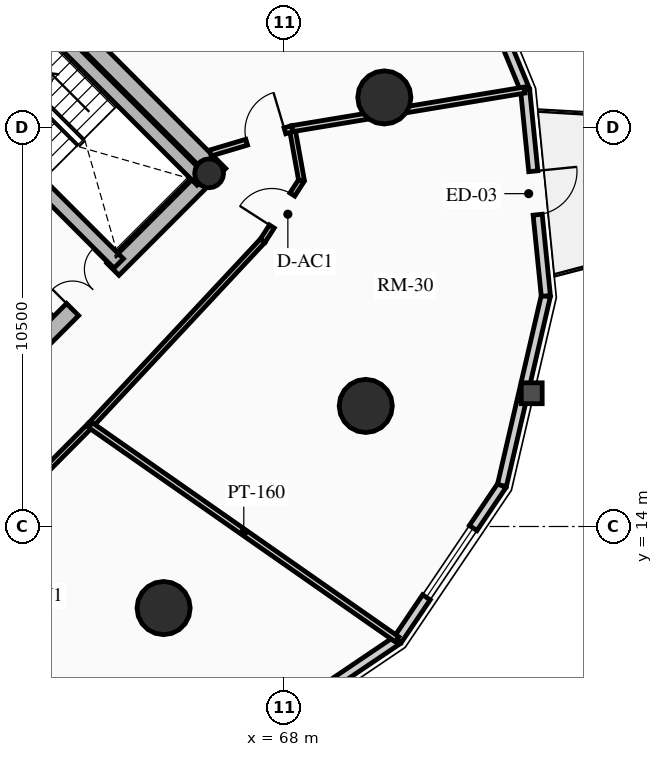
"""IFC4 building model, lengths in metres.
Left out: names, types, materials, properties, quantities, classifications, styles, units other than length and angle.
Written with IfcOpenShell. Run it as: python <this file> out.ifc"""

import sys

from ifc_helpers import new_model, si_unit, direction, frame, frame_2d, origin, origin_2d, place, context, subcontext, project, spatial, rectangle, circle, hollow_circle, extrude, source, transform, mapped, element, fill, save


model = new_model("IFC4")
c1 = context("Model", 3, precision=1e-05, world=origin(), true_north=direction((0.0, 1.0)))
c2 = subcontext(c1, "Body", "Model", "MODEL_VIEW")
j1 = project(units=[si_unit("LENGTHUNIT", "METRE"), si_unit("PLANEANGLEUNIT", "RADIAN")], contexts=[c1])
p1 = place(None, origin())
s1 = spatial("IfcSite", under=j1, at=p1, CompositionType="ELEMENT")
p2 = place(p1, origin())
s2 = spatial("IfcBuilding", under=s1, at=p2, CompositionType="ELEMENT")
p3 = place(p2, frame((0.0, 0.0, 113.8)))
s3 = spatial("IfcBuildingStorey", under=s2, at=p3, CompositionType="ELEMENT", Elevation=113.8)
p4 = place(p3, frame((66.303, 23.263, 0.0), z_axis=(0.0, 0.0, 1.0), x_axis=(-0.707106781187, 0.707106781187, 0.0)))
e1 = element("IfcWall", 1, at=p4, inside=s3, PredefinedType="SHEAR", context=c2, shape_type="SweptSolid", body=[
    extrude(rectangle(XDim=14.2, YDim=0.45, at=frame_2d((7.1, 0.0))), origin(), (0.0, 0.0, 1.0), 2.91),
])
p5 = place(p3, frame((58.578, 15.856, 0.0), z_axis=(0.0, 0.0, 1.0), x_axis=(0.707106781187, 0.707106781187, 0.0)))
e2 = element("IfcWall", 2, at=p5, inside=s3, PredefinedType="SHEAR", context=c2, shape_type="SweptSolid", body=[
    extrude(rectangle(XDim=10.7, YDim=0.45, at=frame_2d((5.35, 0.0))), origin(), (0.0, 0.0, 1.0), 2.91),
])
m1 = source(origin(), c2, "Body", "SweptSolid", [
    extrude(rectangle(XDim=1.5, YDim=2.02, at=frame_2d((0.75, 1.01))), frame((0.0, 0.235, 0.0), z_axis=(0.0, -1.0, 0.0), x_axis=(1.0, 0.0, 0.0)), (0.0, 0.0, 1.0), 0.47),
])
p6 = place(p5, frame((5.45, 0.0, 0.0)))
e3 = element("IfcOpeningElement", 3, at=p6, cuts=e2, PredefinedType="OPENING", context=c2, shape_type="MappedRepresentation", body=[
    mapped(m1, transform((0.0, 0.0, 0.0), x_axis=(1.0, 0.0, 0.0), y_axis=(0.0, 1.0, 0.0), z_axis=(0.0, 0.0, 1.0), scale=1.0)),
])
p7 = place(p3, frame((63.645, 20.922, 0.0), z_axis=(0.0, 0.0, 1.0), x_axis=(-0.707106781187, 0.707106781187, 0.0)))
e4 = element("IfcWall", 4, at=p7, inside=s3, PredefinedType="SHEAR", context=c2, shape_type="SweptSolid", body=[
    extrude(rectangle(XDim=13.75, YDim=0.35, at=frame_2d((6.875, 0.0))), origin(), (0.0, 0.0, 1.0), 2.91),
])
m2 = source(origin(), c2, "Body", "SweptSolid", [
    extrude(rectangle(XDim=1.1, YDim=2.015, at=frame_2d((0.55, 1.007))), frame((0.0, 0.185, 0.0), z_axis=(0.0, -1.0, 0.0), x_axis=(1.0, 0.0, 0.0)), (0.0, 0.0, 1.0), 0.37),
])
p8 = place(p7, frame((10.0, 0.0, 0.0)))
e5 = element("IfcOpeningElement", 5, at=p8, cuts=e4, PredefinedType="OPENING", context=c2, shape_type="MappedRepresentation", body=[
    mapped(m2, transform((0.0, 0.0, 0.0), x_axis=(1.0, 0.0, 0.0), y_axis=(0.0, 1.0, 0.0), z_axis=(0.0, 0.0, 1.0), scale=1.0)),
])
p9 = place(p7, frame((12.0, 0.0, 0.0)))
e6 = element("IfcOpeningElement", 6, at=p9, cuts=e4, PredefinedType="OPENING", context=c2, shape_type="MappedRepresentation", body=[
    mapped(m2, transform((0.0, 0.0, 0.0), x_axis=(1.0, 0.0, 0.0), y_axis=(0.0, 1.0, 0.0), z_axis=(0.0, 0.0, 1.0), scale=1.0)),
])
m3 = source(origin(), c2, "Body", "SweptSolid", [
    extrude(rectangle(XDim=1.15, YDim=2.02, at=frame_2d((0.575, 1.01))), frame((0.0, 0.185, 0.0), z_axis=(0.0, -1.0, 0.0), x_axis=(1.0, 0.0, 0.0)), (0.0, 0.0, 1.0), 0.37),
])
p10 = place(p7, frame((5.305, 0.0, 0.0)))
e7 = element("IfcOpeningElement", 7, at=p10, cuts=e4, PredefinedType="OPENING", context=c2, shape_type="MappedRepresentation", body=[
    mapped(m3, transform((0.0, 0.0, 0.0), x_axis=(1.0, 0.0, 0.0), y_axis=(0.0, 1.0, 0.0), z_axis=(0.0, 0.0, 1.0), scale=1.0)),
])
p11 = place(p3, frame((65.83, 23.107, 0.0), z_axis=(0.0, 0.0, 1.0), x_axis=(-0.707088616009, 0.707124945897, 0.0)))
e8 = element("IfcWall", 8, at=p11, inside=s3, PredefinedType="SHEAR", context=c2, shape_type="SweptSolid", body=[
    extrude(rectangle(XDim=6.72, YDim=0.35, at=frame_2d((3.36, 0.0))), origin(), (0.0, 0.0, 1.0), 2.91),
])
p12 = place(p3, frame((66.024, 23.294, 0.0), z_axis=(0.0, 0.0, 1.0), x_axis=(0.707106781187, 0.707106781187, 0.0)))
e9 = element("IfcColumn", 9, at=p12, inside=s3, PredefinedType="COLUMN", context=c2, shape_type="SweptSolid", body=[
    extrude(hollow_circle(Radius=0.38, WallThickness=0.032, at=origin_2d()), origin(), (0.0, 0.0, 1.0), 2.91),
])
for number, where, z_axis, x_axis in (
    (10, (64.827, 11.854, 0.0), (0.0, 0.0, 1.0), (1.0, 0.0, 0.0)),
    (11, (70.146, 17.173, 0.0), (0.0, 0.0, 1.0), (1.0, 0.0, 0.0)),
    (12, (70.635, 25.291, 0.0), (0.0, 0.0, 1.0), (1.0, 0.0, 0.0)),
):
    element("IfcColumn", number, at=place(p3, frame(where, z_axis=z_axis, x_axis=x_axis)), inside=s3, PredefinedType="USERDEFINED", context=c2, shape_type="SweptSolid", body=[
        extrude(circle(Radius=0.7, at=origin_2d()), origin(), (0.0, 0.0, 1.0), 2.91),
    ])
p13 = place(p3, frame((70.985, 11.015, 0.0), z_axis=(0.0, 0.0, 1.0), x_axis=(-0.828781148131, -0.559572880421, 0.0)))
e13 = element("IfcWall", 13, at=p13, inside=s3, PredefinedType="SOLIDWALL", context=c2, shape_type="SweptSolid", body=[
    extrude(rectangle(XDim=4.905, YDim=0.24, at=frame_2d((2.452, 0.0))), origin(), (0.0, 0.0, 1.0), 2.179),
])
p14 = place(p3, frame((73.729, 15.08, 0.0), z_axis=(0.0, 0.0, 1.0), x_axis=(-0.559572880421, -0.828781148131, 0.0)))
e14 = element("IfcWall", 14, at=p14, inside=s3, PredefinedType="SOLIDWALL", context=c2, shape_type="SweptSolid", body=[
    extrude(rectangle(XDim=4.905, YDim=0.24, at=frame_2d((2.452, 0.0))), origin(), (0.0, 0.0, 1.0), 2.179),
])
m4 = source(origin(), c2, "Body", "SweptSolid", [
    extrude(rectangle(XDim=2.2, YDim=1.35, at=frame_2d((1.1, 0.675))), frame((0.0, 0.13, 0.0), z_axis=(0.0, -1.0, 0.0), x_axis=(1.0, 0.0, 0.0)), (0.0, 0.0, 1.0), 0.26),
])
p15 = place(p14, frame((1.352, 0.0, 0.65)))
e15 = element("IfcOpeningElement", 15, at=p15, cuts=e14, PredefinedType="OPENING", context=c2, shape_type="MappedRepresentation", body=[
    mapped(m4, transform((0.0, 0.0, 0.0), x_axis=(1.0, 0.0, 0.0), y_axis=(0.0, 1.0, 0.0), z_axis=(0.0, 0.0, 1.0), scale=1.0)),
])
p16 = place(p3, frame((74.885, 20.067, 0.0), z_axis=(0.0, 0.0, 1.0), x_axis=(-0.225834725257, -0.974165631126, 0.0)))
e16 = element("IfcWall", 16, at=p16, inside=s3, PredefinedType="SOLIDWALL", context=c2, shape_type="SweptSolid", body=[
    extrude(rectangle(XDim=5.119, YDim=0.24, at=frame_2d((2.56, 0.0))), origin(), (0.0, 0.0, 1.0), 2.179),
])
p17 = place(p3, frame((74.339, 25.487, 0.0), z_axis=(0.0, 0.0, 1.0), x_axis=(0.10015591906, -0.994971754311, 0.0)))
e17 = element("IfcWall", 17, at=p17, inside=s3, PredefinedType="SOLIDWALL", context=c2, shape_type="SweptSolid", body=[
    extrude(rectangle(XDim=5.448, YDim=0.24, at=frame_2d((2.724, 0.0))), origin(), (0.0, 0.0, 1.0), 2.179),
])
m5 = source(origin(), c2, "Body", "SweptSolid", [
    extrude(rectangle(XDim=1.15, YDim=2.005, at=frame_2d((0.575, 1.002))), frame((0.0, 0.13, 0.0), z_axis=(0.0, -1.0, 0.0), x_axis=(1.0, 0.0, 0.0)), (0.0, 0.0, 1.0), 0.26),
])
p18 = place(p17, frame((2.149, 0.0, 0.0)))
e18 = element("IfcOpeningElement", 18, at=p18, cuts=e17, PredefinedType="OPENING", context=c2, shape_type="MappedRepresentation", body=[
    mapped(m5, transform((0.0, 0.0, 0.0), x_axis=(1.0, 0.0, 0.0), y_axis=(0.0, 1.0, 0.0), z_axis=(0.0, 0.0, 1.0), scale=1.0)),
])
p19 = place(p3, frame((72.145, 30.811, 0.0), z_axis=(0.0, 0.0, 1.0), x_axis=(0.381027003055, -0.924563909604, 0.0)))
e19 = element("IfcWall", 19, at=p19, inside=s3, PredefinedType="SOLIDWALL", context=c2, shape_type="SweptSolid", body=[
    extrude(rectangle(XDim=5.758, YDim=0.24, at=frame_2d((2.879, 0.0))), origin(), (0.0, 0.0, 1.0), 2.179),
])
p20 = place(p3, frame((60.562, 14.31, 0.0), z_axis=(0.0, 0.0, 1.0), x_axis=(0.704566236161, 0.709638230975, 0.0)))
e20 = element("IfcWall", 20, at=p20, inside=s3, PredefinedType="PARTITIONING", context=c2, shape_type="SweptSolid", body=[
    extrude(rectangle(XDim=3.321, YDim=0.15, at=frame_2d((1.661, 0.0))), origin(), (0.0, 0.0, 1.0), 2.225),
])
p21 = place(p3, frame((62.903, 16.667, 0.0), z_axis=(0.0, 0.0, 1.0), x_axis=(0.682371947497, 0.731005147225, 0.0)))
e21 = element("IfcWall", 21, at=p21, inside=s3, PredefinedType="PARTITIONING", context=c2, shape_type="SweptSolid", body=[
    extrude(rectangle(XDim=6.642, YDim=0.15, at=frame_2d((3.321, 0.0))), origin(), (0.0, 0.0, 1.0), 2.225),
])
p22 = place(p3, frame((67.435, 21.521, 0.0), z_axis=(0.0, 0.0, 1.0), x_axis=(0.540777197838, 0.841165870859, 0.0)))
e22 = element("IfcWall", 22, at=p22, inside=s3, PredefinedType="PARTITIONING", context=c2, shape_type="SweptSolid", body=[
    extrude(rectangle(XDim=1.888, YDim=0.15, at=frame_2d((0.944, 0.0))), origin(), (0.0, 0.0, 1.0), 2.225),
])
m6 = source(origin(), c2, "Body", "SweptSolid", [
    extrude(rectangle(XDim=1.0, YDim=2.015, at=frame_2d((0.5, 1.007))), frame((0.0, 0.085, 0.0), z_axis=(0.0, -1.0, 0.0), x_axis=(1.0, 0.0, 0.0)), (0.0, 0.0, 1.0), 0.17),
])
p23 = place(p22, frame((0.444, 0.0, 0.0)))
e23 = element("IfcOpeningElement", 23, at=p23, cuts=e22, PredefinedType="OPENING", context=c2, shape_type="MappedRepresentation", body=[
    mapped(m6, transform((0.0, 0.0, 0.0), x_axis=(1.0, 0.0, 0.0), y_axis=(0.0, 1.0, 0.0), z_axis=(0.0, 0.0, 1.0), scale=1.0)),
])
p24 = place(p3, frame((68.456, 23.11, 0.0), z_axis=(0.0, 0.0, 1.0), x_axis=(-0.1772522795, 0.984165448191, 0.0)))
e24 = element("IfcWall", 24, at=p24, inside=s3, PredefinedType="PARTITIONING", context=c2, shape_type="SweptSolid", body=[
    extrude(rectangle(XDim=1.382, YDim=0.15, at=frame_2d((0.691, 0.0))), origin(), (0.0, 0.0, 1.0), 2.225),
])
p25 = place(p3, frame((62.903, 16.667, 0.0), z_axis=(0.0, 0.0, 1.0), x_axis=(0.819735047612, -0.572742919395, 0.0)))
e25 = element("IfcWall", 25, at=p25, inside=s3, PredefinedType="PARTITIONING", context=c2, shape_type="SweptSolid", body=[
    extrude(rectangle(XDim=9.842, YDim=0.16, at=frame_2d((4.921, 0.0))), origin(), (0.0, 0.0, 1.0), 2.179),
])
p26 = place(p3, frame((68.211, 24.469, 0.0), z_axis=(0.0, 0.0, 1.0), x_axis=(0.986479033329, 0.163887512651, 0.0)))
e26 = element("IfcWall", 26, at=p26, inside=s3, PredefinedType="PARTITIONING", context=c2, shape_type="SweptSolid", body=[
    extrude(rectangle(XDim=6.193, YDim=0.16, at=frame_2d((3.096, 0.0))), origin(), (0.0, 0.0, 1.0), 2.179),
])
p27 = place(p3, frame((66.056, 23.828, 0.0), z_axis=(0.0, 0.0, 1.0), x_axis=(0.958475403544, 0.285175210708, 0.0)))
e27 = element("IfcWall", 27, at=p27, inside=s3, PredefinedType="PARTITIONING", context=c2, shape_type="SweptSolid", body=[
    extrude(rectangle(XDim=2.248, YDim=0.16, at=frame_2d((1.124, 0.0))), origin(), (0.0, 0.0, 1.0), 2.225),
])
m7 = source(origin(), c2, "Body", "SweptSolid", [
    extrude(rectangle(XDim=1.05, YDim=2.015, at=frame_2d((0.525, 1.007))), frame((0.0, 0.09, 0.0), z_axis=(0.0, -1.0, 0.0), x_axis=(1.0, 0.0, 0.0)), (0.0, 0.0, 1.0), 0.18),
])
p28 = place(p27, frame((0.998, 0.0, 0.0)))
e28 = element("IfcOpeningElement", 28, at=p28, cuts=e27, PredefinedType="OPENING", context=c2, shape_type="MappedRepresentation", body=[
    mapped(m7, transform((0.0, 0.0, 0.0), x_axis=(1.0, 0.0, 0.0), y_axis=(0.0, 1.0, 0.0), z_axis=(0.0, 0.0, 1.0), scale=1.0)),
])
p29 = place(p3, frame((59.008, 13.963, 0.0), z_axis=(0.0, 0.0, 1.0), x_axis=(0.393439207333, -0.919350635032, 0.0)))
e29 = element("IfcWall", 29, at=p29, inside=s3, PredefinedType="PARTITIONING", context=c2, shape_type="SweptSolid", body=[
    extrude(rectangle(XDim=7.427, YDim=0.125, at=frame_2d((3.713, 0.0))), origin(), (0.0, 0.0, 1.0), 2.179),
])
m8 = source(origin(), c2, "Body", "SweptSolid", [
    extrude(rectangle(XDim=0.9, YDim=2.005, at=frame_2d((0.45, 1.002))), frame((0.0, 0.073, 0.0), z_axis=(0.0, -1.0, 0.0), x_axis=(1.0, 0.0, 0.0)), (0.0, 0.0, 1.0), 0.145),
])
p30 = place(p29, frame((1.8, 0.0, 0.0)))
e30 = element("IfcOpeningElement", 30, at=p30, cuts=e29, PredefinedType="OPENING", context=c2, shape_type="MappedRepresentation", body=[
    mapped(m8, transform((0.0, 0.0, 0.0), x_axis=(1.0, 0.0, 0.0), y_axis=(0.0, 1.0, 0.0), z_axis=(0.0, 0.0, 1.0), scale=1.0)),
])
m9 = source(origin(), c2, "Body", "SweptSolid", [
    extrude(rectangle(XDim=2.2, YDim=1.35, at=frame_2d((1.1, 0.675))), frame((0.0, 0.03, 0.0), z_axis=(0.0, -1.0, 0.0), x_axis=(1.0, 0.0, 0.0)), (0.0, 0.0, 1.0), 0.06),
])
p31 = place(p15, origin())
e31 = element("IfcWindow", 31, at=p31, inside=s3, PartitioningType="DOUBLE_PANEL_VERTICAL", PredefinedType="WINDOW", context=c2, shape_type="MappedRepresentation", body=[
    mapped(m9, transform((0.0, 0.0, 0.0), x_axis=(1.0, 0.0, 0.0), y_axis=(0.0, 1.0, 0.0), z_axis=(0.0, 0.0, 1.0), scale=1.0)),
])
fill(e15, e31)
m10 = source(origin(), c2, "Body", "SweptSolid", [
    extrude(rectangle(XDim=1.15, YDim=2.005, at=frame_2d((0.575, 1.002))), frame((0.0, 0.025, 0.0), z_axis=(0.0, -1.0, 0.0), x_axis=(1.0, 0.0, 0.0)), (0.0, 0.0, 1.0), 0.05),
])
p32 = place(p18, origin())
e32 = element("IfcDoor", 32, at=p32, inside=s3, OperationType="SINGLE_SWING_LEFT", PredefinedType="DOOR", context=c2, shape_type="MappedRepresentation", body=[
    mapped(m10, transform((0.0, 0.0, 0.0), x_axis=(1.0, 0.0, 0.0), y_axis=(0.0, 1.0, 0.0), z_axis=(0.0, 0.0, 1.0), scale=1.0)),
])
fill(e18, e32)
m11 = source(origin(), c2, "Body", "SweptSolid", [
    extrude(rectangle(XDim=1.5, YDim=2.02, at=frame_2d((0.75, 1.01))), frame((0.0, 0.025, 0.0), z_axis=(0.0, -1.0, 0.0), x_axis=(1.0, 0.0, 0.0)), (0.0, 0.0, 1.0), 0.05),
])
p33 = place(p6, origin())
e33 = element("IfcDoor", 33, at=p33, inside=s3, OperationType="DOUBLE_DOOR_SINGLE_SWING", PredefinedType="DOOR", context=c2, shape_type="MappedRepresentation", body=[
    mapped(m11, transform((0.0, 0.0, 0.0), x_axis=(1.0, 0.0, 0.0), y_axis=(0.0, 1.0, 0.0), z_axis=(0.0, 0.0, 1.0), scale=1.0)),
])
fill(e3, e33)
m12 = source(origin(), c2, "Body", "SweptSolid", [
    extrude(rectangle(XDim=1.05, YDim=2.015, at=frame_2d((0.525, 1.007))), frame((0.0, 0.025, 0.0), z_axis=(0.0, -1.0, 0.0), x_axis=(1.0, 0.0, 0.0)), (0.0, 0.0, 1.0), 0.05),
])
p34 = place(p28, origin())
e34 = element("IfcDoor", 34, at=p34, inside=s3, OperationType="SINGLE_SWING_RIGHT", PredefinedType="DOOR", context=c2, shape_type="MappedRepresentation", body=[
    mapped(m12, transform((0.0, 0.0, 0.0), x_axis=(1.0, 0.0, 0.0), y_axis=(0.0, 1.0, 0.0), z_axis=(0.0, 0.0, 1.0), scale=1.0)),
])
fill(e28, e34)
m13 = source(origin(), c2, "Body", "SweptSolid", [
    extrude(rectangle(XDim=1.0, YDim=2.015, at=frame_2d((0.5, 1.007))), frame((0.0, 0.025, 0.0), z_axis=(0.0, -1.0, 0.0), x_axis=(1.0, 0.0, 0.0)), (0.0, 0.0, 1.0), 0.05),
])
p35 = place(p23, origin())
e35 = element("IfcDoor", 35, at=p35, inside=s3, OperationType="SINGLE_SWING_LEFT", PredefinedType="DOOR", context=c2, shape_type="MappedRepresentation", body=[
    mapped(m13, transform((0.0, 0.0, 0.0), x_axis=(1.0, 0.0, 0.0), y_axis=(0.0, 1.0, 0.0), z_axis=(0.0, 0.0, 1.0), scale=1.0)),
])
fill(e23, e35)
save(model, sys.argv[1])
